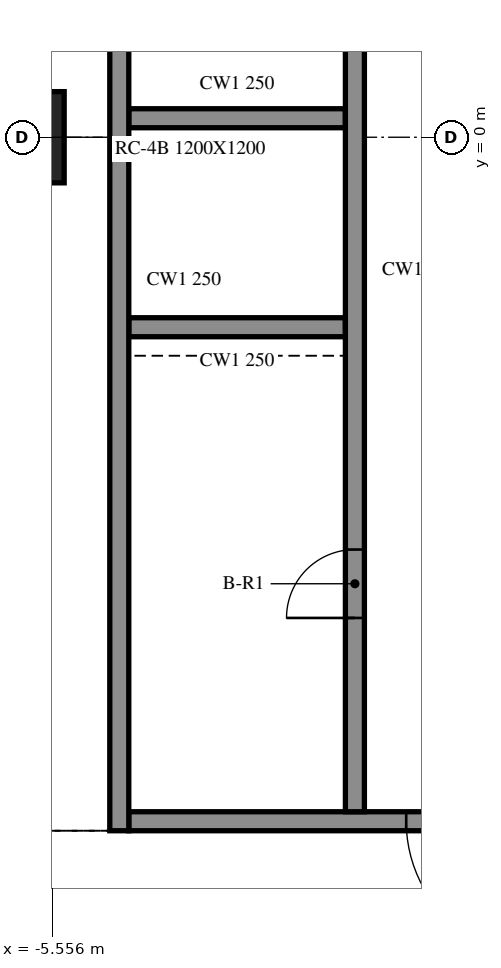
"""IFC4 building model, lengths in metres.
Left out: names, types, materials, properties, quantities, classifications, styles, units other than length and angle.
Written with IfcOpenShell. Run it as: python <this file> out.ifc"""

import sys

from ifc_helpers import new_model, si_unit, direction, frame, frame_2d, origin, origin_2d, place, context, subcontext, project, spatial, rectangle, extrude, element, fill, save


model = new_model("IFC4")
c1 = context("Model", 3, precision=1e-05, world=origin(), true_north=direction((0.0, 1.0)))
c2 = subcontext(c1, "Body", "Model", "MODEL_VIEW")
j1 = project(units=[si_unit("LENGTHUNIT", "METRE"), si_unit("PLANEANGLEUNIT", "RADIAN")], contexts=[c1])
p1 = place(None, origin())
s1 = spatial("IfcSite", under=j1, at=p1, CompositionType="ELEMENT")
p2 = place(p1, origin())
s2 = spatial("IfcBuilding", under=s1, at=p2, CompositionType="ELEMENT")
p3 = place(p2, frame((0.0, 0.0, 189.6)))
s3 = spatial("IfcBuildingStorey", under=s2, at=p3, CompositionType="ELEMENT", Elevation=189.6)
p4 = place(p3, frame((-6.0, 0.0, -0.4), z_axis=(0.0, 0.0, 1.0), x_axis=(1.0, 0.0, 0.0)))
e1 = element("IfcColumn", 1, at=p4, inside=s3, PredefinedType="COLUMN", context=c2, shape_type="SweptSolid", body=[
    extrude(rectangle(XDim=1.2, YDim=1.2, at=origin_2d()), origin(), (0.0, 0.0, 1.0), 4.36),
])
p5 = place(p3, frame((-4.675, 15.125, 0.0), z_axis=(0.0, 0.0, 1.0), x_axis=(0.0, -1.0, 0.0)))
e2 = element("IfcWall", 2, at=p5, inside=s3, PredefinedType="SOLIDWALL", context=c2, shape_type="SweptSolid", body=[
    extrude(rectangle(XDim=24.25, YDim=0.25, at=frame_2d((12.125, 0.0))), origin(), (0.0, 0.0, 1.0), 3.96),
])
p6 = place(p3, frame((4.55, -9.0, 0.0), z_axis=(0.0, 0.0, 1.0), x_axis=(-1.0, 0.0, 0.0)))
e3 = element("IfcWall", 3, at=p6, inside=s3, PredefinedType="SOLIDWALL", context=c2, shape_type="SweptSolid", body=[
    extrude(rectangle(XDim=9.1, YDim=0.25, at=frame_2d((4.55, 0.0))), origin(), (0.0, 0.0, 1.0), 3.96),
])
p7 = place(p6, frame((3.65, 0.0, 0.0)))
e4 = element("IfcOpeningElement", 4, at=p7, cuts=e3, PredefinedType="OPENING", context=c2, shape_type="SweptSolid", body=[
    extrude(rectangle(XDim=1.8, YDim=2.1, at=frame_2d((0.9, 1.05))), frame((0.0, 0.135, 0.0), z_axis=(0.0, -1.0, 0.0), x_axis=(1.0, 0.0, 0.0)), (0.0, 0.0, 1.0), 0.27),
])
p8 = place(p3, frame((-1.575, -8.875, 0.0), z_axis=(0.0, 0.0, 1.0), x_axis=(0.0, 1.0, 0.0)))
e5 = element("IfcWall", 5, at=p8, inside=s3, PredefinedType="SOLIDWALL", context=c2, shape_type="SweptSolid", body=[
    extrude(rectangle(XDim=23.75, YDim=0.25, at=frame_2d((11.875, 0.0))), origin(), (0.0, 0.0, 1.0), 3.96),
])
p9 = place(p8, frame((2.55, 0.0, 0.0)))
e6 = element("IfcOpeningElement", 6, at=p9, cuts=e5, PredefinedType="OPENING", context=c2, shape_type="SweptSolid", body=[
    extrude(rectangle(XDim=0.9, YDim=2.1, at=frame_2d((0.45, 1.05))), frame((0.0, 0.135, 0.0), z_axis=(0.0, -1.0, 0.0), x_axis=(1.0, 0.0, 0.0)), (0.0, 0.0, 1.0), 0.27),
])
p10 = place(p8, frame((19.002, 0.0, 0.0)))
e7 = element("IfcOpeningElement", 7, at=p10, cuts=e5, PredefinedType="OPENING", context=c2, shape_type="SweptSolid", body=[
    extrude(rectangle(XDim=0.9, YDim=2.1, at=frame_2d((0.45, 1.05))), frame((0.0, 0.135, 0.0), z_axis=(0.0, -1.0, 0.0), x_axis=(1.0, 0.0, 0.0)), (0.0, 0.0, 1.0), 0.27),
])
p11 = place(p8, frame((22.077, 0.0, 0.0)))
e8 = element("IfcOpeningElement", 8, at=p11, cuts=e5, PredefinedType="OPENING", context=c2, shape_type="SweptSolid", body=[
    extrude(rectangle(XDim=0.9, YDim=2.1, at=frame_2d((0.45, 1.05))), frame((0.0, 0.135, 0.0), z_axis=(0.0, -1.0, 0.0), x_axis=(1.0, 0.0, 0.0)), (0.0, 0.0, 1.0), 0.27),
])
for number, where, z_axis, x_axis in (
    (9, (-4.55, -2.5, 0.0), (0.0, 0.0, 1.0), (1.0, 0.0, 0.0)),
    (10, (-4.55, 0.25, 0.0), (0.0, 0.0, 1.0), (1.0, 0.0, 0.0)),
):
    element("IfcWall", number, at=place(p3, frame(where, z_axis=z_axis, x_axis=x_axis)), inside=s3, PredefinedType="SOLIDWALL", context=c2, shape_type="SweptSolid", body=[
        extrude(rectangle(XDim=2.85, YDim=0.25, at=frame_2d((1.425, 0.0))), origin(), (0.0, 0.0, 1.0), 3.96),
    ])
p12 = place(p7, origin())
e11 = element("IfcDoor", 11, at=p12, inside=s3, OperationType="DOUBLE_DOOR_SINGLE_SWING", PredefinedType="DOOR", context=c2, shape_type="SweptSolid", body=[
    extrude(rectangle(XDim=1.8, YDim=2.1, at=frame_2d((0.9, 1.05))), frame((0.0, 0.025, 0.0), z_axis=(0.0, -1.0, 0.0), x_axis=(1.0, 0.0, 0.0)), (0.0, 0.0, 1.0), 0.05),
])
fill(e4, e11)
p13 = place(p9, origin())
e12 = element("IfcDoor", 12, at=p13, inside=s3, OperationType="SINGLE_SWING_LEFT", PredefinedType="DOOR", context=c2, shape_type="SweptSolid", body=[
    extrude(rectangle(XDim=0.9, YDim=2.1, at=frame_2d((0.45, 1.05))), frame((0.0, 0.025, 0.0), z_axis=(0.0, -1.0, 0.0), x_axis=(1.0, 0.0, 0.0)), (0.0, 0.0, 1.0), 0.05),
])
fill(e6, e12)
save(model, sys.argv[1])
